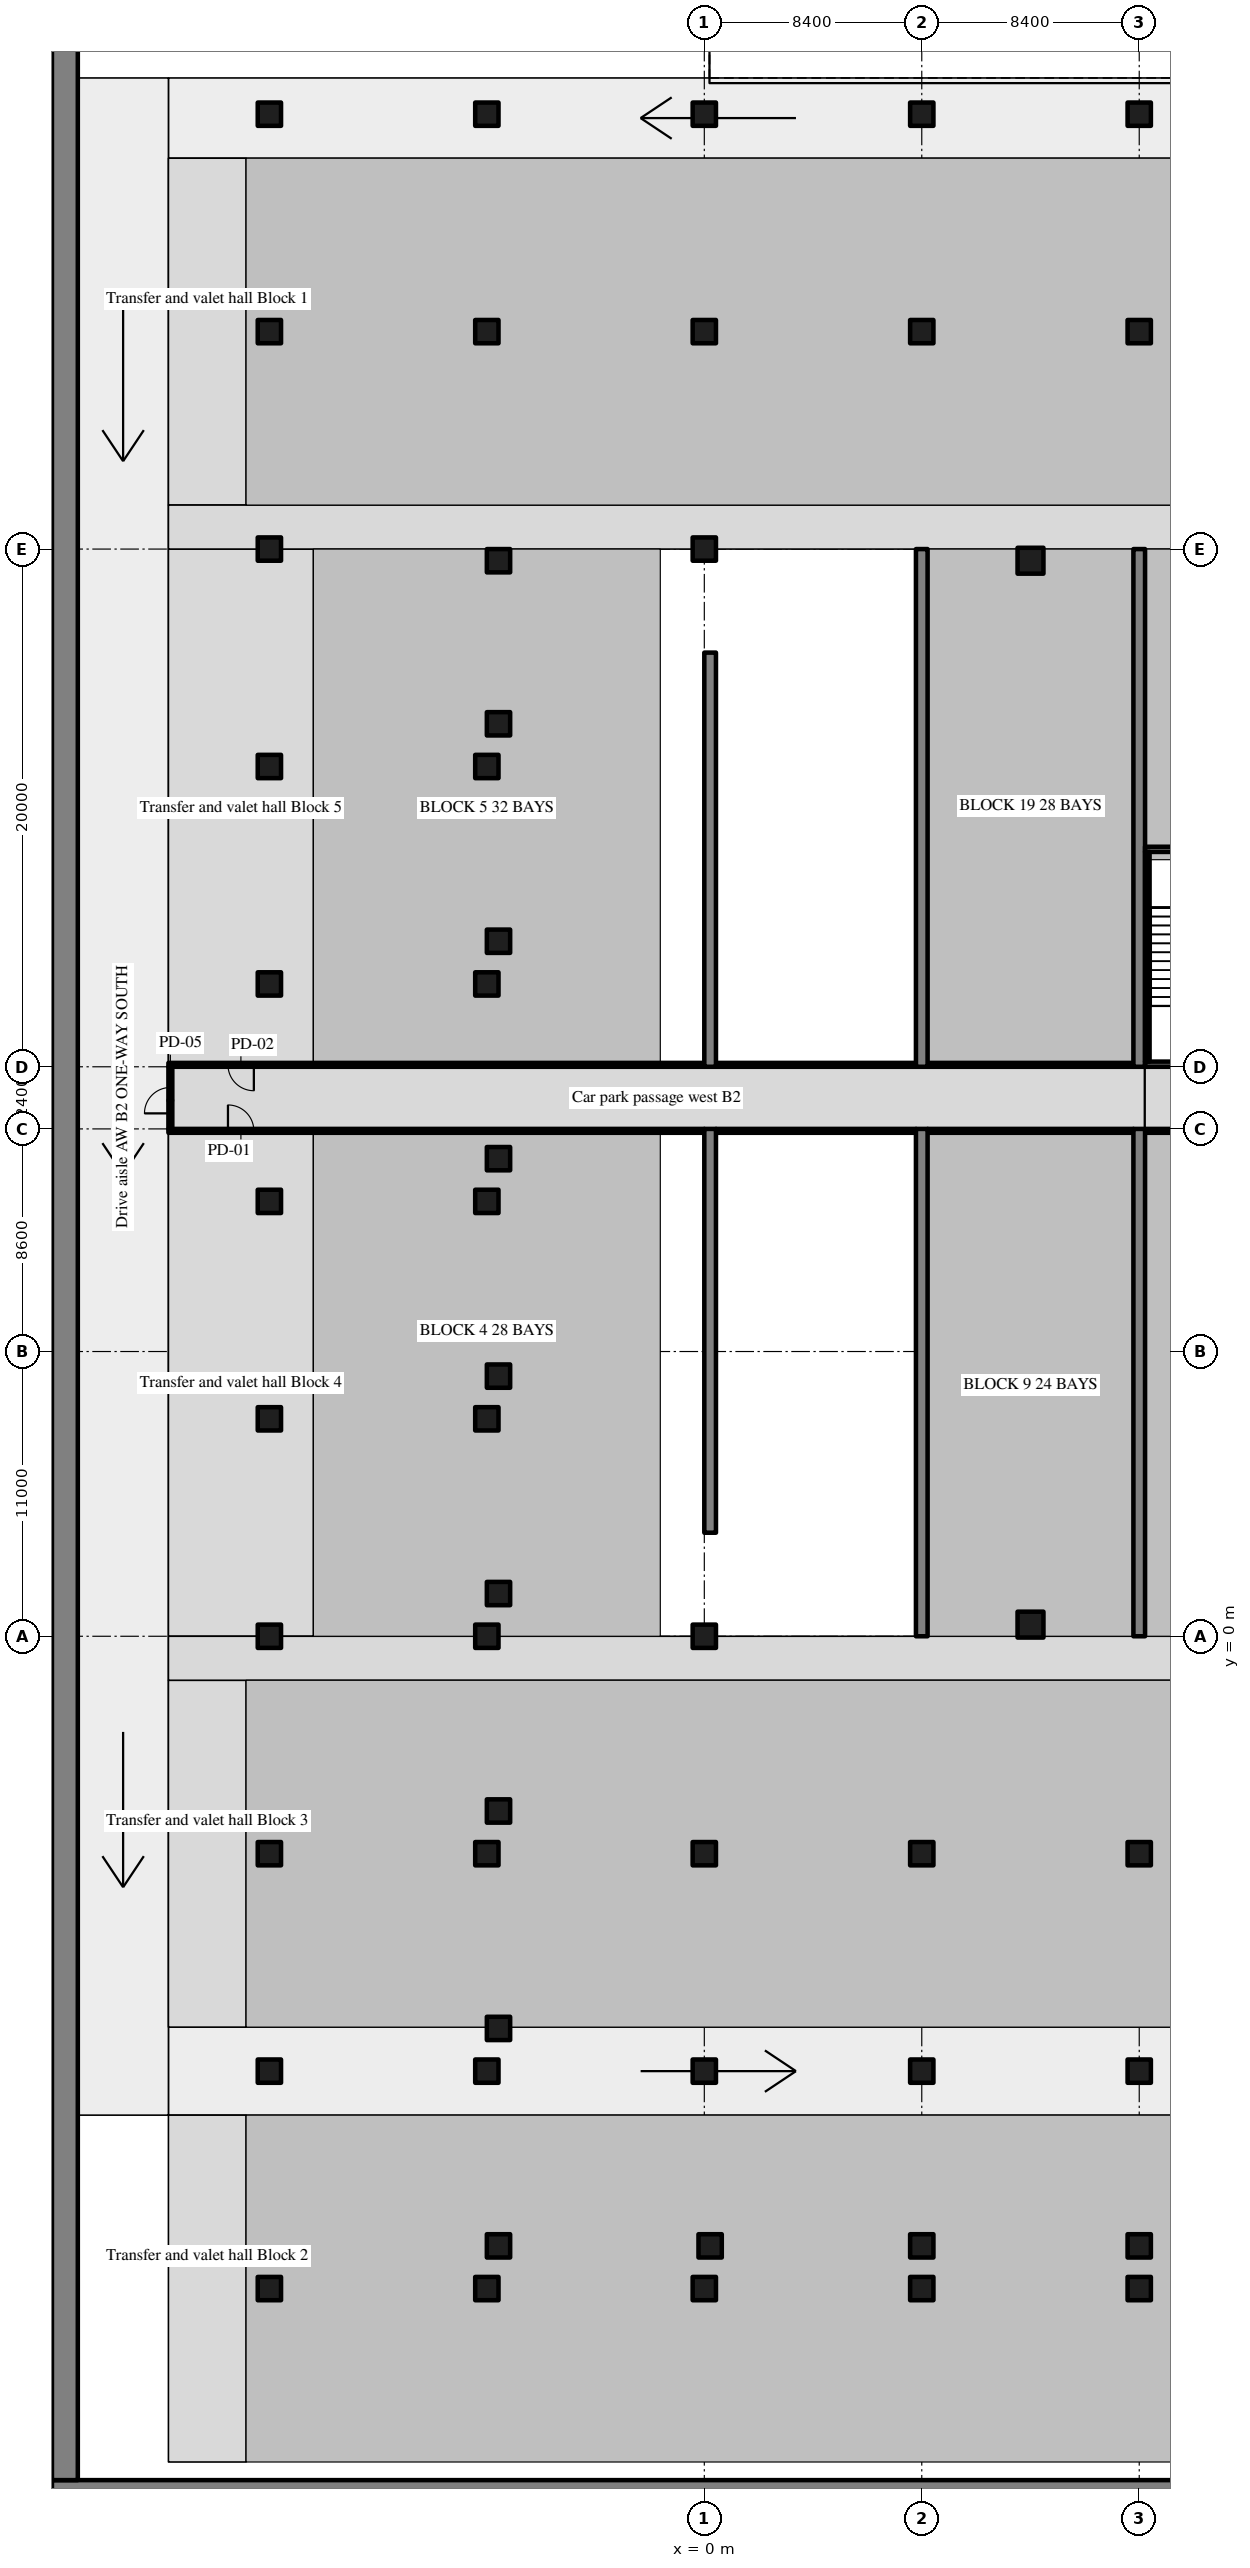
"""IFC4 building model, lengths in metres.
Left out: names, types, materials, properties, quantities, classifications, styles, units other than length and angle.
Written with IfcOpenShell. Run it as: python <this file> out.ifc"""

import sys

from ifc_helpers import new_model, si_unit, direction, frame, frame_2d, origin, origin_2d, place, context, subcontext, project, spatial, rectangle, extrude, source, transform, mapped, element, fill, save


model = new_model("IFC4")
c1 = context("Model", 3, precision=1e-05, world=origin(), true_north=direction((0.0, 1.0)))
c2 = subcontext(c1, "Body", "Model", "MODEL_VIEW")
j1 = project(units=[si_unit("LENGTHUNIT", "METRE"), si_unit("PLANEANGLEUNIT", "RADIAN")], contexts=[c1])
p1 = place(None, origin())
s1 = spatial("IfcSite", under=j1, at=p1, CompositionType="ELEMENT")
p2 = place(p1, origin())
s2 = spatial("IfcBuilding", under=s1, at=p2, CompositionType="ELEMENT")
p3 = place(p2, frame((0.0, 0.0, -9.0)))
s3 = spatial("IfcBuildingStorey", under=s2, at=p3, CompositionType="ELEMENT", Elevation=-9.0)
m1 = source(origin(), c2, "Body", "SweptSolid", [
    extrude(rectangle(XDim=151.2, YDim=1.0, at=frame_2d((75.6, 0.0))), origin(), (0.0, 0.0, 1.0), 4.22),
])
p4 = place(p3, frame((-25.2, -33.1, 0.0), z_axis=(0.0, 0.0, 1.0), x_axis=(1.0, 0.0, 0.0)))
e1 = element("IfcWall", 1, at=p4, inside=s3, PredefinedType="SHEAR", context=c2, shape_type="MappedRepresentation", body=[
    mapped(m1, transform((0.0, 0.0, 0.0), scale=1.0)),
])
m2 = source(origin(), c2, "Body", "SweptSolid", [
    extrude(rectangle(XDim=98.8, YDim=1.0, at=frame_2d((49.4, 0.0))), origin(), (0.0, 0.0, 1.0), 4.22),
])
p5 = place(p3, frame((-24.7, -32.6, 0.0), z_axis=(0.0, 0.0, 1.0), x_axis=(0.0, 1.0, 0.0)))
e2 = element("IfcWall", 2, at=p5, inside=s3, PredefinedType="SHEAR", context=c2, shape_type="MappedRepresentation", body=[
    mapped(m2, transform((0.0, 0.0, 0.0), scale=1.0)),
])
m3 = source(origin(), c2, "Body", "SweptSolid", [
    extrude(rectangle(XDim=15.6, YDim=0.45, at=frame_2d((7.8, 0.0))), origin(), (0.0, 0.0, 1.0), 4.22),
])
p6 = place(p3, frame((0.225, 4.0, 0.0), z_axis=(0.0, 0.0, 1.0), x_axis=(0.0, 1.0, 0.0)))
e3 = element("IfcWall", 3, at=p6, inside=s3, PredefinedType="SHEAR", context=c2, shape_type="MappedRepresentation", body=[
    mapped(m3, transform((0.0, 0.0, 0.0), scale=1.0)),
])
m4 = source(origin(), c2, "Body", "SweptSolid", [
    extrude(rectangle(XDim=16.0, YDim=0.45, at=frame_2d((8.0, 0.0))), origin(), (0.0, 0.0, 1.0), 4.22),
])
p7 = place(p3, frame((0.225, 22.0, 0.0), z_axis=(0.0, 0.0, 1.0), x_axis=(0.0, 1.0, 0.0)))
e4 = element("IfcWall", 4, at=p7, inside=s3, PredefinedType="SHEAR", context=c2, shape_type="MappedRepresentation", body=[
    mapped(m4, transform((0.0, 0.0, 0.0), scale=1.0)),
])
m5 = source(origin(), c2, "Body", "SweptSolid", [
    extrude(rectangle(XDim=19.6, YDim=0.45, at=frame_2d((9.8, 0.0))), origin(), (0.0, 0.0, 1.0), 4.22),
])
p8 = place(p3, frame((8.4, 0.0, 0.0), z_axis=(0.0, 0.0, 1.0), x_axis=(0.0, 1.0, 0.0)))
e5 = element("IfcWall", 5, at=p8, inside=s3, PredefinedType="SHEAR", context=c2, shape_type="MappedRepresentation", body=[
    mapped(m5, transform((0.0, 0.0, 0.0), scale=1.0)),
])
m6 = source(origin(), c2, "Body", "SweptSolid", [
    extrude(rectangle(XDim=20.0, YDim=0.45, at=frame_2d((10.0, 0.0))), origin(), (0.0, 0.0, 1.0), 4.22),
])
p9 = place(p3, frame((8.4, 22.0, 0.0), z_axis=(0.0, 0.0, 1.0), x_axis=(0.0, 1.0, 0.0)))
e6 = element("IfcWall", 6, at=p9, inside=s3, PredefinedType="SHEAR", context=c2, shape_type="MappedRepresentation", body=[
    mapped(m6, transform((0.0, 0.0, 0.0), scale=1.0)),
])
p10 = place(p3, frame((16.8, 0.0, 0.0), z_axis=(0.0, 0.0, 1.0), x_axis=(0.0, 1.0, 0.0)))
e7 = element("IfcWall", 7, at=p10, inside=s3, PredefinedType="SHEAR", context=c2, shape_type="MappedRepresentation", body=[
    mapped(m5, transform((0.0, 0.0, 0.0), scale=1.0)),
])
p11 = place(p3, frame((16.8, 22.0, 0.0), z_axis=(0.0, 0.0, 1.0), x_axis=(0.0, 1.0, 0.0)))
e8 = element("IfcWall", 8, at=p11, inside=s3, PredefinedType="SHEAR", context=c2, shape_type="MappedRepresentation", body=[
    mapped(m6, transform((0.0, 0.0, 0.0), scale=1.0)),
])
m7 = source(origin(), c2, "Body", "SweptSolid", [
    extrude(rectangle(XDim=1.0, YDim=1.0, at=origin_2d()), origin(), (0.0, 0.0, 1.0), 4.22),
])
for number, where, z_axis, x_axis in (
    (9, (12.6, 0.45, 0.0), (0.0, 0.0, 1.0), (1.0, 0.0, 0.0)),
    (10, (12.6, 41.55, 0.0), (0.0, 0.0, 1.0), (1.0, 0.0, 0.0)),
):
    element("IfcColumn", number, at=place(p3, frame(where, z_axis=z_axis, x_axis=x_axis)), inside=s3, PredefinedType="COLUMN", context=c2, shape_type="MappedRepresentation", body=[
        mapped(m7, transform((0.0, 0.0, 0.0), scale=1.0)),
    ])
m8 = source(origin(), c2, "Body", "SweptSolid", [
    extrude(rectangle(XDim=0.9, YDim=0.9, at=origin_2d()), origin(), (0.0, 0.0, 1.0), 4.22),
])
for number, where, z_axis, x_axis in (
    (11, (-7.95, -23.55, 0.0), (0.0, 0.0, 1.0), (1.0, 0.0, 0.0)),
    (12, (-7.95, -15.15, 0.0), (0.0, 0.0, 1.0), (1.0, 0.0, 0.0)),
    (13, (-7.95, -6.75, 0.0), (0.0, 0.0, 1.0), (1.0, 0.0, 0.0)),
    (14, (-7.95, 1.65, 0.0), (0.0, 0.0, 1.0), (1.0, 0.0, 0.0)),
    (15, (-7.95, 10.05, 0.0), (0.0, 0.0, 1.0), (1.0, 0.0, 0.0)),
    (16, (-7.95, 18.45, 0.0), (0.0, 0.0, 1.0), (1.0, 0.0, 0.0)),
    (17, (-7.95, 26.85, 0.0), (0.0, 0.0, 1.0), (1.0, 0.0, 0.0)),
    (18, (-7.95, 35.25, 0.0), (0.0, 0.0, 1.0), (1.0, 0.0, 0.0)),
    (19, (-7.95, 41.55, 0.0), (0.0, 0.0, 1.0), (1.0, 0.0, 0.0)),
    (20, (0.225, -23.55, 0.0), (0.0, 0.0, 1.0), (1.0, 0.0, 0.0)),
    (21, (8.4, -23.55, 0.0), (0.0, 0.0, 1.0), (1.0, 0.0, 0.0)),
    (22, (16.8, -23.55, 0.0), (0.0, 0.0, 1.0), (1.0, 0.0, 0.0)),
    (23, (-16.8, -25.2, 0.0), (0.0, 0.0, 1.0), (1.0, 0.0, 0.0)),
    (24, (-16.8, -16.8, 0.0), (0.0, 0.0, 1.0), (1.0, 0.0, 0.0)),
    (25, (-16.8, -8.4, 0.0), (0.0, 0.0, 1.0), (1.0, 0.0, 0.0)),
    (26, (-16.8, 0.0, 0.0), (0.0, 0.0, 1.0), (1.0, 0.0, 0.0)),
    (27, (-16.8, 8.4, 0.0), (0.0, 0.0, 1.0), (1.0, 0.0, 0.0)),
    (28, (-16.8, 16.8, 0.0), (0.0, 0.0, 1.0), (1.0, 0.0, 0.0)),
    (29, (-16.8, 25.2, 0.0), (0.0, 0.0, 1.0), (1.0, 0.0, 0.0)),
    (30, (-16.8, 33.6, 0.0), (0.0, 0.0, 1.0), (1.0, 0.0, 0.0)),
    (31, (-16.8, 42.0, 0.0), (0.0, 0.0, 1.0), (1.0, 0.0, 0.0)),
    (32, (-16.8, 50.4, 0.0), (0.0, 0.0, 1.0), (1.0, 0.0, 0.0)),
    (33, (-16.8, 58.8, 0.0), (0.0, 0.0, 1.0), (1.0, 0.0, 0.0)),
    (34, (-8.4, -25.2, 0.0), (0.0, 0.0, 1.0), (1.0, 0.0, 0.0)),
    (35, (-8.4, -16.8, 0.0), (0.0, 0.0, 1.0), (1.0, 0.0, 0.0)),
    (36, (-8.4, -8.4, 0.0), (0.0, 0.0, 1.0), (1.0, 0.0, 0.0)),
    (37, (-8.4, 0.0, 0.0), (0.0, 0.0, 1.0), (1.0, 0.0, 0.0)),
    (38, (-8.4, 8.4, 0.0), (0.0, 0.0, 1.0), (1.0, 0.0, 0.0)),
    (39, (-8.4, 16.8, 0.0), (0.0, 0.0, 1.0), (1.0, 0.0, 0.0)),
    (40, (-8.4, 25.2, 0.0), (0.0, 0.0, 1.0), (1.0, 0.0, 0.0)),
    (41, (-8.4, 33.6, 0.0), (0.0, 0.0, 1.0), (1.0, 0.0, 0.0)),
    (42, (-8.4, 50.4, 0.0), (0.0, 0.0, 1.0), (1.0, 0.0, 0.0)),
    (43, (-8.4, 58.8, 0.0), (0.0, 0.0, 1.0), (1.0, 0.0, 0.0)),
    (44, (0.0, -25.2, 0.0), (0.0, 0.0, 1.0), (1.0, 0.0, 0.0)),
    (45, (0.0, -16.8, 0.0), (0.0, 0.0, 1.0), (1.0, 0.0, 0.0)),
    (46, (0.0, -8.4, 0.0), (0.0, 0.0, 1.0), (1.0, 0.0, 0.0)),
    (47, (0.0, 0.0, 0.0), (0.0, 0.0, 1.0), (1.0, 0.0, 0.0)),
    (48, (0.0, 42.0, 0.0), (0.0, 0.0, 1.0), (1.0, 0.0, 0.0)),
    (49, (0.0, 50.4, 0.0), (0.0, 0.0, 1.0), (1.0, 0.0, 0.0)),
    (50, (0.0, 58.8, 0.0), (0.0, 0.0, 1.0), (1.0, 0.0, 0.0)),
    (51, (8.4, -25.2, 0.0), (0.0, 0.0, 1.0), (1.0, 0.0, 0.0)),
    (52, (8.4, -16.8, 0.0), (0.0, 0.0, 1.0), (1.0, 0.0, 0.0)),
    (53, (8.4, -8.4, 0.0), (0.0, 0.0, 1.0), (1.0, 0.0, 0.0)),
    (54, (8.4, 50.4, 0.0), (0.0, 0.0, 1.0), (1.0, 0.0, 0.0)),
    (55, (8.4, 58.8, 0.0), (0.0, 0.0, 1.0), (1.0, 0.0, 0.0)),
    (56, (16.8, -25.2, 0.0), (0.0, 0.0, 1.0), (1.0, 0.0, 0.0)),
    (57, (16.8, -16.8, 0.0), (0.0, 0.0, 1.0), (1.0, 0.0, 0.0)),
    (58, (16.8, -8.4, 0.0), (0.0, 0.0, 1.0), (1.0, 0.0, 0.0)),
    (59, (16.8, 50.4, 0.0), (0.0, 0.0, 1.0), (1.0, 0.0, 0.0)),
    (60, (16.8, 58.8, 0.0), (0.0, 0.0, 1.0), (1.0, 0.0, 0.0)),
):
    element("IfcColumn", number, at=place(p3, frame(where, z_axis=z_axis, x_axis=x_axis)), inside=s3, PredefinedType="COLUMN", context=c2, shape_type="MappedRepresentation", body=[
        mapped(m8, transform((0.0, 0.0, 0.0), scale=1.0)),
    ])
m9 = source(origin(), c2, "Body", "SweptSolid", [
    extrude(rectangle(XDim=8.175, YDim=0.2, at=frame_2d((4.087, 0.0))), origin(), (0.0, 0.0, 1.0), 4.22),
])
p12 = place(p3, frame((17.025, 22.1, 0.0), z_axis=(0.0, 0.0, 1.0), x_axis=(1.0, 0.0, 0.0)))
e61 = element("IfcWall", 61, at=p12, inside=s3, PredefinedType="SOLIDWALL", context=c2, shape_type="MappedRepresentation", body=[
    mapped(m9, transform((0.0, 0.0, 0.0), scale=1.0)),
])
m10 = source(origin(), c2, "Body", "SweptSolid", [
    extrude(rectangle(XDim=1.2, YDim=2.1, at=frame_2d((0.6, 1.05))), frame((0.0, 0.11, 0.0), z_axis=(0.0, -1.0, 0.0), x_axis=(1.0, 0.0, 0.0)), (0.0, 0.0, 1.0), 0.22),
])
p13 = place(p12, frame((5.975, 0.0, 0.0)))
e62 = element("IfcOpeningElement", 62, at=p13, cuts=e61, PredefinedType="OPENING", context=c2, shape_type="MappedRepresentation", body=[
    mapped(m10, transform((0.0, 0.0, 0.0), scale=1.0)),
])
p14 = place(p3, frame((17.025, 30.4, 0.0), z_axis=(0.0, 0.0, 1.0), x_axis=(1.0, 0.0, 0.0)))
e63 = element("IfcWall", 63, at=p14, inside=s3, PredefinedType="SOLIDWALL", context=c2, shape_type="MappedRepresentation", body=[
    mapped(m9, transform((0.0, 0.0, 0.0), scale=1.0)),
])
m11 = source(origin(), c2, "Body", "SweptSolid", [
    extrude(rectangle(XDim=1.0, YDim=2.1, at=frame_2d((0.5, 1.05))), frame((0.0, 0.11, 0.0), z_axis=(0.0, -1.0, 0.0), x_axis=(1.0, 0.0, 0.0)), (0.0, 0.0, 1.0), 0.22),
])
p15 = place(p14, frame((6.075, 0.0, 0.0)))
e64 = element("IfcOpeningElement", 64, at=p15, cuts=e63, PredefinedType="OPENING", context=c2, shape_type="MappedRepresentation", body=[
    mapped(m11, transform((0.0, 0.0, 0.0), scale=1.0)),
])
m12 = source(origin(), c2, "Body", "SweptSolid", [
    extrude(rectangle(XDim=8.1, YDim=0.175, at=frame_2d((4.05, 0.0))), origin(), (0.0, 0.0, 1.0), 4.22),
])
p16 = place(p3, frame((17.112, 22.2, 0.0), z_axis=(0.0, 0.0, 1.0), x_axis=(0.0, 1.0, 0.0)))
e65 = element("IfcWall", 65, at=p16, inside=s3, PredefinedType="SOLIDWALL", context=c2, shape_type="MappedRepresentation", body=[
    mapped(m12, transform((0.0, 0.0, 0.0), scale=1.0)),
])
m13 = source(origin(), c2, "Body", "SweptSolid", [
    extrude(rectangle(XDim=20.7, YDim=0.15, at=frame_2d((10.35, 0.0))), origin(), (0.0, 0.0, 1.0), 4.22),
])
p17 = place(p3, frame((-20.7, 19.525, 0.0), z_axis=(0.0, 0.0, 1.0), x_axis=(1.0, 0.0, 0.0)))
e66 = element("IfcWall", 66, at=p17, inside=s3, PredefinedType="PARTITIONING", context=c2, shape_type="MappedRepresentation", body=[
    mapped(m13, transform((0.0, 0.0, 0.0), scale=1.0)),
])
m14 = source(origin(), c2, "Body", "SweptSolid", [
    extrude(rectangle(XDim=1.0, YDim=2.1, at=frame_2d((0.5, 1.05))), frame((0.0, 0.085, 0.0), z_axis=(0.0, -1.0, 0.0), x_axis=(1.0, 0.0, 0.0)), (0.0, 0.0, 1.0), 0.17),
])
p18 = place(p17, frame((2.3, 0.0, 0.0)))
e67 = element("IfcOpeningElement", 67, at=p18, cuts=e66, PredefinedType="OPENING", context=c2, shape_type="MappedRepresentation", body=[
    mapped(m14, transform((0.0, 0.0, 0.0), scale=1.0)),
])
p19 = place(p3, frame((-20.7, 22.075, 0.0), z_axis=(0.0, 0.0, 1.0), x_axis=(1.0, 0.0, 0.0)))
e68 = element("IfcWall", 68, at=p19, inside=s3, PredefinedType="PARTITIONING", context=c2, shape_type="MappedRepresentation", body=[
    mapped(m13, transform((0.0, 0.0, 0.0), scale=1.0)),
])
p20 = place(p19, frame((2.3, 0.0, 0.0)))
e69 = element("IfcOpeningElement", 69, at=p20, cuts=e68, PredefinedType="OPENING", context=c2, shape_type="MappedRepresentation", body=[
    mapped(m14, transform((0.0, 0.0, 0.0), scale=1.0)),
])
m15 = source(origin(), c2, "Body", "SweptSolid", [
    extrude(rectangle(XDim=7.725, YDim=0.15, at=frame_2d((3.863, 0.0))), origin(), (0.0, 0.0, 1.0), 4.22),
])
for number, where, z_axis, x_axis in (
    (70, (0.45, 19.525, 0.0), (0.0, 0.0, 1.0), (1.0, 0.0, 0.0)),
    (71, (0.45, 22.075, 0.0), (0.0, 0.0, 1.0), (1.0, 0.0, 0.0)),
):
    element("IfcWall", number, at=place(p3, frame(where, z_axis=z_axis, x_axis=x_axis)), inside=s3, PredefinedType="PARTITIONING", context=c2, shape_type="MappedRepresentation", body=[
        mapped(m15, transform((0.0, 0.0, 0.0), scale=1.0)),
    ])
m16 = source(origin(), c2, "Body", "SweptSolid", [
    extrude(rectangle(XDim=7.95, YDim=0.15, at=frame_2d((3.975, 0.0))), origin(), (0.0, 0.0, 1.0), 4.22),
])
for number, where, z_axis, x_axis in (
    (72, (8.625, 19.525, 0.0), (0.0, 0.0, 1.0), (1.0, 0.0, 0.0)),
    (73, (8.625, 22.075, 0.0), (0.0, 0.0, 1.0), (1.0, 0.0, 0.0)),
):
    element("IfcWall", number, at=place(p3, frame(where, z_axis=z_axis, x_axis=x_axis)), inside=s3, PredefinedType="PARTITIONING", context=c2, shape_type="MappedRepresentation", body=[
        mapped(m16, transform((0.0, 0.0, 0.0), scale=1.0)),
    ])
m17 = source(origin(), c2, "Body", "SweptSolid", [
    extrude(rectangle(XDim=7.95, YDim=0.15, at=frame_2d((3.975, 0.0))), origin(), (0.0, 0.0, 1.0), 4.22),
])
p21 = place(p3, frame((17.025, 19.525, 0.0), z_axis=(0.0, 0.0, 1.0), x_axis=(1.0, 0.0, 0.0)))
e74 = element("IfcWall", 74, at=p21, inside=s3, PredefinedType="PARTITIONING", context=c2, shape_type="MappedRepresentation", body=[
    mapped(m17, transform((0.0, 0.0, 0.0), scale=1.0)),
])
m18 = source(origin(), c2, "Body", "SweptSolid", [
    extrude(rectangle(XDim=2.4, YDim=0.15, at=frame_2d((1.2, 0.0))), origin(), (0.0, 0.0, 1.0), 4.22),
])
p22 = place(p3, frame((-20.625, 19.6, 0.0), z_axis=(0.0, 0.0, 1.0), x_axis=(0.0, 1.0, 0.0)))
e75 = element("IfcWall", 75, at=p22, inside=s3, PredefinedType="PARTITIONING", context=c2, shape_type="MappedRepresentation", body=[
    mapped(m18, transform((0.0, 0.0, 0.0), scale=1.0)),
])
p23 = place(p22, frame((0.6, 0.0, 0.0)))
e76 = element("IfcOpeningElement", 76, at=p23, cuts=e75, PredefinedType="OPENING", context=c2, shape_type="MappedRepresentation", body=[
    mapped(m14, transform((0.0, 0.0, 0.0), scale=1.0)),
])
m19 = source(origin(), c2, "Body", "SweptSolid", [
    extrude(rectangle(XDim=1.0, YDim=2.1, at=frame_2d((0.5, 1.05))), frame((0.0, 0.025, 0.0), z_axis=(0.0, -1.0, 0.0), x_axis=(1.0, 0.0, 0.0)), (0.0, 0.0, 1.0), 0.05),
])
p24 = place(p18, origin())
e77 = element("IfcDoor", 77, at=p24, inside=s3, OperationType="SINGLE_SWING_LEFT", PredefinedType="DOOR", context=c2, shape_type="MappedRepresentation", body=[
    mapped(m19, transform((0.0, 0.0, 0.0), scale=1.0)),
])
fill(e67, e77)
p25 = place(p20, origin())
e78 = element("IfcDoor", 78, at=p25, inside=s3, OperationType="SINGLE_SWING_RIGHT", PredefinedType="DOOR", context=c2, shape_type="MappedRepresentation", body=[
    mapped(m19, transform((0.0, 0.0, 0.0), scale=1.0)),
])
fill(e69, e78)
p26 = place(p23, origin())
e79 = element("IfcDoor", 79, at=p26, inside=s3, OperationType="SINGLE_SWING_LEFT", PredefinedType="DOOR", context=c2, shape_type="MappedRepresentation", body=[
    mapped(m19, transform((0.0, 0.0, 0.0), scale=1.0)),
])
fill(e76, e79)
save(model, sys.argv[1])
